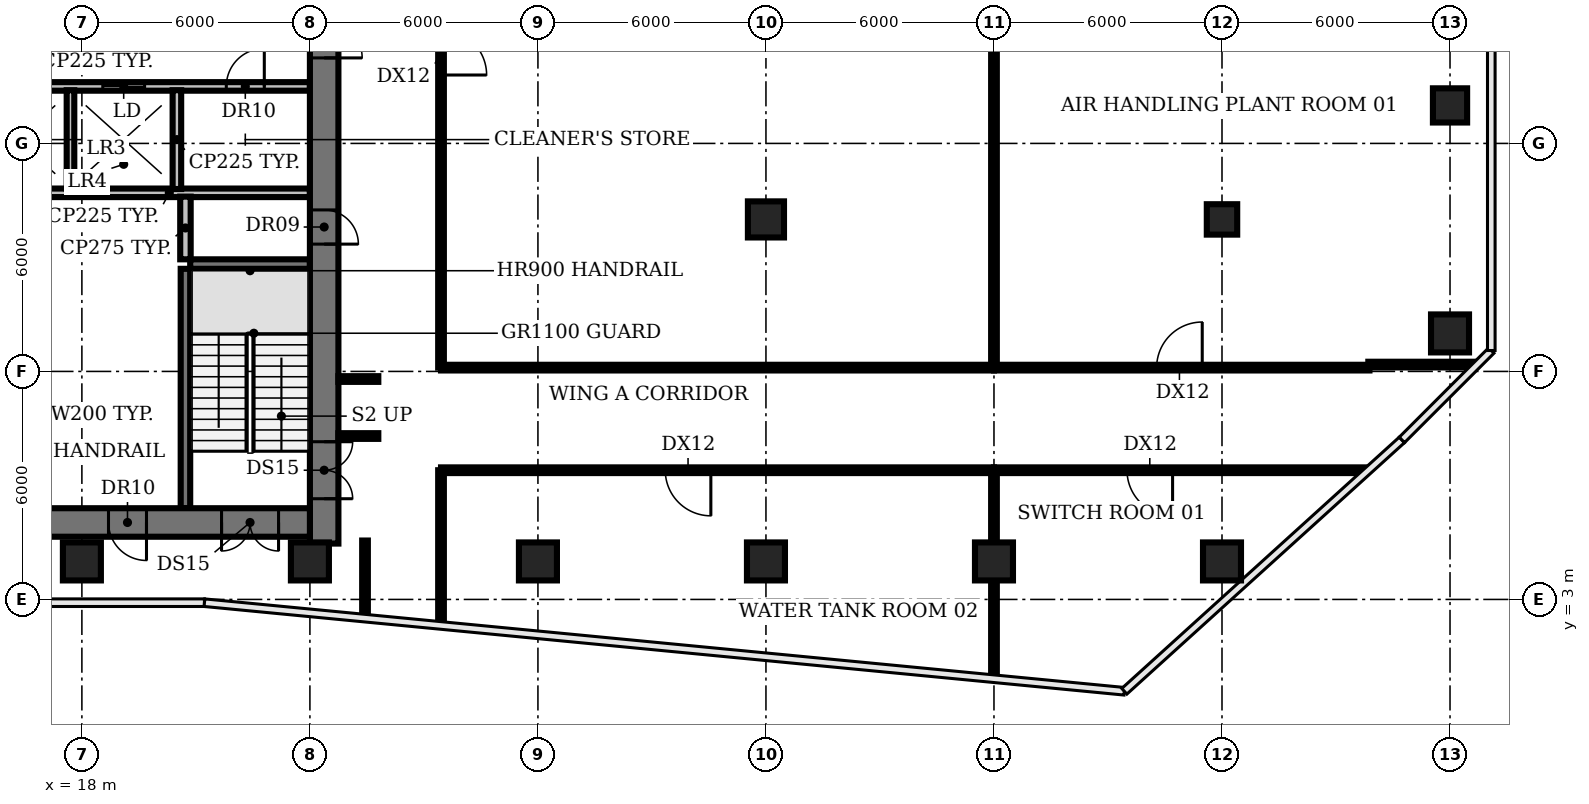
"""IFC4 building model, lengths in metres.
Left out: names, types, materials, properties, quantities, classifications, styles, units other than length and angle.
Written with IfcOpenShell. Run it as: python <this file> out.ifc"""

import sys

from ifc_helpers import new_model, si_unit, direction, frame, frame_2d, origin, origin_2d, place, context, subcontext, project, spatial, rectangle, circle, extrude, element, fill, save


model = new_model("IFC4")
c1 = context("Model", 3, precision=1e-05, world=origin(), true_north=direction((0.0, 1.0)))
c2 = subcontext(c1, "Body", "Model", "MODEL_VIEW")
j1 = project(units=[si_unit("LENGTHUNIT", "METRE"), si_unit("PLANEANGLEUNIT", "RADIAN")], contexts=[c1])
p1 = place(None, origin())
s1 = spatial("IfcSite", under=j1, at=p1, CompositionType="ELEMENT")
p2 = place(p1, origin())
s2 = spatial("IfcBuilding", under=s1, at=p2, CompositionType="ELEMENT")
p3 = place(p2, frame((0.0, 0.0, 134.0)))
s3 = spatial("IfcBuildingStorey", under=s2, at=p3, CompositionType="ELEMENT", Elevation=134.0)
for number, where, z_axis, x_axis in (
    (1, (18.0, 4.0, 0.0), (0.0, 0.0, 1.0), (1.0, 0.0, 0.0)),
    (2, (24.0, 4.0, 0.0), (0.0, 0.0, 1.0), (1.0, 0.0, 0.0)),
    (3, (30.0, 4.0, 0.0), (0.0, 0.0, 1.0), (1.0, 0.0, 0.0)),
    (4, (36.0, 4.0, 0.0), (0.0, 0.0, 1.0), (1.0, 0.0, 0.0)),
):
    element("IfcColumn", number, at=place(p3, frame(where, z_axis=z_axis, x_axis=x_axis)), inside=s3, PredefinedType="COLUMN", context=c2, shape_type="SweptSolid", body=[
        extrude(rectangle(XDim=1.0, YDim=1.0, at=origin_2d()), origin(), (0.0, 0.0, 1.0), 3.2),
    ])
p4 = place(p3, frame((36.0, 13.0, 0.0), z_axis=(0.0, 0.0, 1.0), x_axis=(1.0, 0.0, 0.0)))
e5 = element("IfcColumn", 5, at=p4, inside=s3, PredefinedType="COLUMN", context=c2, shape_type="SweptSolid", body=[
    extrude(rectangle(XDim=0.95, YDim=0.95, at=origin_2d()), origin(), (0.0, 0.0, 1.0), 3.2),
])
p5 = place(p3, frame((42.0, 4.0, 0.0), z_axis=(0.0, 0.0, 1.0), x_axis=(1.0, 0.0, 0.0)))
e6 = element("IfcColumn", 6, at=p5, inside=s3, PredefinedType="COLUMN", context=c2, shape_type="SweptSolid", body=[
    extrude(rectangle(XDim=1.0, YDim=1.0, at=origin_2d()), origin(), (0.0, 0.0, 1.0), 3.2),
])
p6 = place(p3, frame((48.0, 4.0, 0.0), z_axis=(0.0, 0.0, 1.0), x_axis=(1.0, 0.0, 0.0)))
e7 = element("IfcColumn", 7, at=p6, inside=s3, PredefinedType="COLUMN", context=c2, shape_type="SweptSolid", body=[
    extrude(circle(Radius=0.5, at=origin_2d()), origin(), (0.0, 0.0, 1.0), 3.8),
])
p7 = place(p3, frame((48.0, 13.0, 0.0), z_axis=(0.0, 0.0, 1.0), x_axis=(1.0, 0.0, 0.0)))
e8 = element("IfcColumn", 8, at=p7, inside=s3, PredefinedType="COLUMN", context=c2, shape_type="SweptSolid", body=[
    extrude(rectangle(XDim=0.8, YDim=0.8, at=origin_2d()), origin(), (0.0, 0.0, 1.0), 3.8),
])
p8 = place(p3, frame((54.0, 10.0, 0.0), z_axis=(0.0, 0.0, 1.0), x_axis=(1.0, 0.0, 0.0)))
e9 = element("IfcColumn", 9, at=p8, inside=s3, PredefinedType="COLUMN", context=c2, shape_type="SweptSolid", body=[
    extrude(circle(Radius=0.5, at=origin_2d()), origin(), (0.0, 0.0, 1.0), 3.8),
])
p9 = place(p3, frame((54.0, 16.0, 0.0), z_axis=(0.0, 0.0, 1.0), x_axis=(1.0, 0.0, 0.0)))
e10 = element("IfcColumn", 10, at=p9, inside=s3, PredefinedType="COLUMN", context=c2, shape_type="SweptSolid", body=[
    extrude(rectangle(XDim=0.9, YDim=0.9, at=origin_2d()), origin(), (0.0, 0.0, 1.0), 3.8),
])
p10 = place(p3, frame((20.85, 11.825, 0.0), z_axis=(0.0, 0.0, 1.0), x_axis=(1.0, 0.0, 0.0)))
e11 = element("IfcWall", 11, at=p10, inside=s3, PredefinedType="SHEAR", context=c2, shape_type="SweptSolid", body=[
    extrude(rectangle(XDim=3.15, YDim=0.25, at=frame_2d((1.575, 0.0))), origin(), (0.0, 0.0, 1.0), 3.8),
])
p11 = place(p3, frame((16.6, 13.7, 0.0), z_axis=(0.0, 0.0, 1.0), x_axis=(1.0, 0.0, 0.0)))
e12 = element("IfcWall", 12, at=p11, inside=s3, PredefinedType="PARTITIONING", context=c2, shape_type="SweptSolid", body=[
    extrude(rectangle(XDim=7.4, YDim=0.225, at=frame_2d((3.7, 0.0))), origin(), (0.0, 0.0, 1.0), 3.8),
])
p12 = place(p3, frame((9.4, 16.5, 0.0), z_axis=(0.0, 0.0, 1.0), x_axis=(1.0, 0.0, 0.0)))
e13 = element("IfcWall", 13, at=p12, inside=s3, PredefinedType="PARTITIONING", context=c2, shape_type="SweptSolid", body=[
    extrude(rectangle(XDim=14.6, YDim=0.225, at=frame_2d((7.3, 0.0))), origin(), (0.0, 0.0, 1.0), 3.8),
])
p13 = place(p12, frame((0.75, 0.0, 0.0)))
e14 = element("IfcOpeningElement", 14, at=p13, cuts=e13, PredefinedType="OPENING", context=c2, shape_type="SweptSolid", body=[
    extrude(rectangle(XDim=1.1, YDim=2.1, at=frame_2d((0.55, 1.05))), frame((0.0, 0.123, 0.0), z_axis=(0.0, -1.0, 0.0), x_axis=(1.0, 0.0, 0.0)), (0.0, 0.0, 1.0), 0.245),
])
p14 = place(p12, frame((3.55, 0.0, 0.0)))
e15 = element("IfcOpeningElement", 15, at=p14, cuts=e13, PredefinedType="OPENING", context=c2, shape_type="SweptSolid", body=[
    extrude(rectangle(XDim=1.1, YDim=2.1, at=frame_2d((0.55, 1.05))), frame((0.0, 0.123, 0.0), z_axis=(0.0, -1.0, 0.0), x_axis=(1.0, 0.0, 0.0)), (0.0, 0.0, 1.0), 0.245),
])
p15 = place(p12, frame((6.35, 0.0, 0.0)))
e16 = element("IfcOpeningElement", 16, at=p15, cuts=e13, PredefinedType="OPENING", context=c2, shape_type="SweptSolid", body=[
    extrude(rectangle(XDim=1.1, YDim=2.1, at=frame_2d((0.55, 1.05))), frame((0.0, 0.123, 0.0), z_axis=(0.0, -1.0, 0.0), x_axis=(1.0, 0.0, 0.0)), (0.0, 0.0, 1.0), 0.245),
])
p16 = place(p12, frame((9.15, 0.0, 0.0)))
e17 = element("IfcOpeningElement", 17, at=p16, cuts=e13, PredefinedType="OPENING", context=c2, shape_type="SweptSolid", body=[
    extrude(rectangle(XDim=1.1, YDim=2.1, at=frame_2d((0.55, 1.05))), frame((0.0, 0.123, 0.0), z_axis=(0.0, -1.0, 0.0), x_axis=(1.0, 0.0, 0.0)), (0.0, 0.0, 1.0), 0.245),
])
p17 = place(p12, frame((12.4, 0.0, 0.0)))
e18 = element("IfcOpeningElement", 18, at=p17, cuts=e13, PredefinedType="OPENING", context=c2, shape_type="SweptSolid", body=[
    extrude(rectangle(XDim=1.0, YDim=2.1, at=frame_2d((0.5, 1.05))), frame((0.0, 0.123, 0.0), z_axis=(0.0, -1.0, 0.0), x_axis=(1.0, 0.0, 0.0)), (0.0, 0.0, 1.0), 0.245),
])
p18 = place(p3, frame((17.7, 13.8, 0.0), z_axis=(0.0, 0.0, 1.0), x_axis=(0.0, 1.0, 0.0)))
e19 = element("IfcWall", 19, at=p18, inside=s3, PredefinedType="SOLIDWALL", context=c2, shape_type="SweptSolid", body=[
    extrude(rectangle(XDim=2.6, YDim=0.2, at=frame_2d((1.3, 0.0))), origin(), (0.0, 0.0, 1.0), 3.8),
])
p19 = place(p3, frame((20.5, 13.8, 0.0), z_axis=(0.0, 0.0, 1.0), x_axis=(0.0, 1.0, 0.0)))
e20 = element("IfcWall", 20, at=p19, inside=s3, PredefinedType="PARTITIONING", context=c2, shape_type="SweptSolid", body=[
    extrude(rectangle(XDim=2.6, YDim=0.225, at=frame_2d((1.3, 0.0))), origin(), (0.0, 0.0, 1.0), 3.8),
])
p20 = place(p3, frame((20.725, 5.4, 0.0), z_axis=(0.0, 0.0, 1.0), x_axis=(0.0, 1.0, 0.0)))
e21 = element("IfcWall", 21, at=p20, inside=s3, PredefinedType="SHEAR", context=c2, shape_type="SweptSolid", body=[
    extrude(rectangle(XDim=6.3, YDim=0.25, at=frame_2d((3.15, 0.0))), origin(), (0.0, 0.0, 1.0), 3.8),
])
p21 = place(p3, frame((20.725, 11.95, 0.0), z_axis=(0.0, 0.0, 1.0), x_axis=(0.0, 1.0, 0.0)))
e22 = element("IfcWall", 22, at=p21, inside=s3, PredefinedType="PARTITIONING", context=c2, shape_type="SweptSolid", body=[
    extrude(rectangle(XDim=1.65, YDim=0.275, at=frame_2d((0.825, 0.0))), origin(), (0.0, 0.0, 1.0), 3.8),
])
p22 = place(p3, frame((24.375, 25.55, 0.0), z_axis=(0.0, 0.0, 1.0), x_axis=(0.0, -1.0, 0.0)))
e23 = element("IfcWall", 23, at=p22, inside=s3, PredefinedType="SHEAR", context=c2, shape_type="SweptSolid", body=[
    extrude(rectangle(XDim=21.08, YDim=0.75, at=frame_2d((10.54, 0.0))), origin(), (0.0, 0.0, 1.0), 3.8),
])
p23 = place(p22, frame((18.4, 0.0, 0.0)))
e24 = element("IfcOpeningElement", 24, at=p23, cuts=e23, PredefinedType="OPENING", context=c2, shape_type="SweptSolid", body=[
    extrude(rectangle(XDim=1.5, YDim=2.1, at=frame_2d((0.75, 1.05))), frame((0.0, 0.385, 0.0), z_axis=(0.0, -1.0, 0.0), x_axis=(1.0, 0.0, 0.0)), (0.0, 0.0, 1.0), 0.77),
])
p24 = place(p22, frame((12.3, 0.0, 0.0)))
e25 = element("IfcOpeningElement", 25, at=p24, cuts=e23, PredefinedType="OPENING", context=c2, shape_type="SweptSolid", body=[
    extrude(rectangle(XDim=0.9, YDim=2.1, at=frame_2d((0.45, 1.05))), frame((0.0, 0.385, 0.0), z_axis=(0.0, -1.0, 0.0), x_axis=(1.0, 0.0, 0.0)), (0.0, 0.0, 1.0), 0.77),
])
p25 = place(p22, frame((6.3, 0.0, 0.0)))
e26 = element("IfcOpeningElement", 26, at=p25, cuts=e23, PredefinedType="OPENING", context=c2, shape_type="SweptSolid", body=[
    extrude(rectangle(XDim=2.0, YDim=2.1, at=frame_2d((1.0, 1.05))), frame((0.0, 0.385, 0.0), z_axis=(0.0, -1.0, 0.0), x_axis=(1.0, 0.0, 0.0)), (0.0, 0.0, 1.0), 0.77),
])
p26 = place(p3, frame((24.0, 5.025, 0.0), z_axis=(0.0, 0.0, 1.0), x_axis=(-1.0, 0.0, 0.0)))
e27 = element("IfcWall", 27, at=p26, inside=s3, PredefinedType="SHEAR", context=c2, shape_type="SweptSolid", body=[
    extrude(rectangle(XDim=18.0, YDim=0.75, at=frame_2d((9.0, 0.0))), origin(), (0.0, 0.0, 1.0), 3.8),
])
p27 = place(p26, frame((0.825, 0.0, 0.0)))
e28 = element("IfcOpeningElement", 28, at=p27, cuts=e27, PredefinedType="OPENING", context=c2, shape_type="SweptSolid", body=[
    extrude(rectangle(XDim=1.5, YDim=2.1, at=frame_2d((0.75, 1.05))), frame((0.0, 0.385, 0.0), z_axis=(0.0, -1.0, 0.0), x_axis=(1.0, 0.0, 0.0)), (0.0, 0.0, 1.0), 0.77),
])
p28 = place(p26, frame((15.675, 0.0, 0.0)))
e29 = element("IfcOpeningElement", 29, at=p28, cuts=e27, PredefinedType="OPENING", context=c2, shape_type="SweptSolid", body=[
    extrude(rectangle(XDim=1.5, YDim=2.1, at=frame_2d((0.75, 1.05))), frame((0.0, 0.385, 0.0), z_axis=(0.0, -1.0, 0.0), x_axis=(1.0, 0.0, 0.0)), (0.0, 0.0, 1.0), 0.77),
])
p29 = place(p26, frame((13.0, 0.0, 0.0)))
e30 = element("IfcOpeningElement", 30, at=p29, cuts=e27, PredefinedType="OPENING", context=c2, shape_type="SweptSolid", body=[
    extrude(rectangle(XDim=1.2, YDim=2.1, at=frame_2d((0.6, 1.05))), frame((0.0, 0.385, 0.0), z_axis=(0.0, -1.0, 0.0), x_axis=(1.0, 0.0, 0.0)), (0.0, 0.0, 1.0), 0.77),
])
p30 = place(p26, frame((4.3, 0.0, 0.0)))
e31 = element("IfcOpeningElement", 31, at=p30, cuts=e27, PredefinedType="OPENING", context=c2, shape_type="SweptSolid", body=[
    extrude(rectangle(XDim=1.0, YDim=2.1, at=frame_2d((0.5, 1.05))), frame((0.0, 0.385, 0.0), z_axis=(0.0, -1.0, 0.0), x_axis=(1.0, 0.0, 0.0)), (0.0, 0.0, 1.0), 0.77),
])
for number, where, z_axis, x_axis in (
    (32, (24.75, 7.3, 0.0), (0.0, 0.0, 1.0), (1.0, 0.0, 0.0)),
    (33, (24.75, 8.8, 0.0), (0.0, 0.0, 1.0), (1.0, 0.0, 0.0)),
):
    element("IfcWall", number, at=place(p3, frame(where, z_axis=z_axis, x_axis=x_axis)), inside=s3, PredefinedType="PARTITIONING", context=c2, shape_type="SweptSolid", body=[
        extrude(rectangle(XDim=1.05, YDim=0.15, at=frame_2d((0.525, 0.0))), origin(), (0.0, 0.0, 1.0), 2.78),
    ])
p31 = place(p3, frame((25.45, 2.56, 0.0), z_axis=(0.0, 0.0, 1.0), x_axis=(0.0, 1.0, 0.0)))
e34 = element("IfcWall", 34, at=p31, inside=s3, PredefinedType="PARTITIONING", context=c2, shape_type="SweptSolid", body=[
    extrude(rectangle(XDim=1.99, YDim=0.15, at=frame_2d((0.995, 0.0))), origin(), (0.0, 0.0, 1.0), 2.78),
])
p32 = place(p3, frame((27.45, 2.36, 0.0), z_axis=(0.0, 0.0, 1.0), x_axis=(0.0, 1.0, 0.0)))
e35 = element("IfcWall", 35, at=p32, inside=s3, PredefinedType="PARTITIONING", context=c2, shape_type="SweptSolid", body=[
    extrude(rectangle(XDim=4.04, YDim=0.15, at=frame_2d((2.02, 0.0))), origin(), (0.0, 0.0, 1.0), 2.78),
])
p33 = place(p3, frame((27.45, 9.1, 0.0), z_axis=(0.0, 0.0, 1.0), x_axis=(1.0, 0.0, 0.0)))
e36 = element("IfcWall", 36, at=p33, inside=s3, PredefinedType="PARTITIONING", context=c2, shape_type="SweptSolid", body=[
    extrude(rectangle(XDim=14.55, YDim=0.15, at=frame_2d((7.275, 0.0))), origin(), (0.0, 0.0, 1.0), 2.78),
])
p34 = place(p3, frame((27.45, 25.55, 0.0), z_axis=(0.0, 0.0, 1.0), x_axis=(0.0, -1.0, 0.0)))
e37 = element("IfcWall", 37, at=p34, inside=s3, PredefinedType="PARTITIONING", context=c2, shape_type="SweptSolid", body=[
    extrude(rectangle(XDim=16.45, YDim=0.15, at=frame_2d((8.225, 0.0))), origin(), (0.0, 0.0, 1.0), 2.78),
])
p35 = place(p34, frame((7.55, 0.0, 0.0)))
e38 = element("IfcOpeningElement", 38, at=p35, cuts=e37, PredefinedType="OPENING", context=c2, shape_type="SweptSolid", body=[
    extrude(rectangle(XDim=1.2, YDim=2.1, at=frame_2d((0.6, 1.05))), frame((0.0, 0.085, 0.0), z_axis=(0.0, -1.0, 0.0), x_axis=(1.0, 0.0, 0.0)), (0.0, 0.0, 1.0), 0.17),
])
p36 = place(p3, frame((42.0, 0.96, 0.0), z_axis=(0.0, 0.0, 1.0), x_axis=(0.0, 1.0, 0.0)))
e39 = element("IfcWall", 39, at=p36, inside=s3, PredefinedType="PARTITIONING", context=c2, shape_type="SweptSolid", body=[
    extrude(rectangle(XDim=5.44, YDim=0.15, at=frame_2d((2.72, 0.0))), origin(), (0.0, 0.0, 1.0), 2.78),
])
p37 = place(p3, frame((42.0, 6.4, 0.0), z_axis=(0.0, 0.0, 1.0), x_axis=(-1.0, 0.0, 0.0)))
e40 = element("IfcWall", 40, at=p37, inside=s3, PredefinedType="PARTITIONING", context=c2, shape_type="SweptSolid", body=[
    extrude(rectangle(XDim=14.55, YDim=0.15, at=frame_2d((7.275, 0.0))), origin(), (0.0, 0.0, 1.0), 2.78),
])
p38 = place(p37, frame((7.45, 0.0, 0.0)))
e41 = element("IfcOpeningElement", 41, at=p38, cuts=e40, PredefinedType="OPENING", context=c2, shape_type="SweptSolid", body=[
    extrude(rectangle(XDim=1.2, YDim=2.1, at=frame_2d((0.6, 1.05))), frame((0.0, 0.085, 0.0), z_axis=(0.0, -1.0, 0.0), x_axis=(1.0, 0.0, 0.0)), (0.0, 0.0, 1.0), 0.17),
])
p39 = place(p3, frame((42.0, 9.1, 0.0), z_axis=(0.0, 0.0, 1.0), x_axis=(0.0, 1.0, 0.0)))
e42 = element("IfcWall", 42, at=p39, inside=s3, PredefinedType="PARTITIONING", context=c2, shape_type="SweptSolid", body=[
    extrude(rectangle(XDim=19.94, YDim=0.15, at=frame_2d((9.97, 0.0))), origin(), (0.0, 0.0, 1.0), 2.78),
])
p40 = place(p3, frame((42.0, 9.1, 0.0), z_axis=(0.0, 0.0, 1.0), x_axis=(1.0, 0.0, 0.0)))
e43 = element("IfcWall", 43, at=p40, inside=s3, PredefinedType="PARTITIONING", context=c2, shape_type="SweptSolid", body=[
    extrude(rectangle(XDim=9.88, YDim=0.15, at=frame_2d((4.94, 0.0))), origin(), (0.0, 0.0, 1.0), 2.78),
])
p41 = place(p40, frame((4.28, 0.0, 0.0)))
e44 = element("IfcOpeningElement", 44, at=p41, cuts=e43, PredefinedType="OPENING", context=c2, shape_type="SweptSolid", body=[
    extrude(rectangle(XDim=1.2, YDim=2.1, at=frame_2d((0.6, 1.05))), frame((0.0, 0.085, 0.0), z_axis=(0.0, -1.0, 0.0), x_axis=(1.0, 0.0, 0.0)), (0.0, 0.0, 1.0), 0.17),
])
p42 = place(p3, frame((51.78, 6.4, 0.0), z_axis=(0.0, 0.0, 1.0), x_axis=(-1.0, 0.0, 0.0)))
e45 = element("IfcWall", 45, at=p42, inside=s3, PredefinedType="PARTITIONING", context=c2, shape_type="SweptSolid", body=[
    extrude(rectangle(XDim=9.78, YDim=0.15, at=frame_2d((4.89, 0.0))), origin(), (0.0, 0.0, 1.0), 2.78),
])
p43 = place(p42, frame((5.08, 0.0, 0.0)))
e46 = element("IfcOpeningElement", 46, at=p43, cuts=e45, PredefinedType="OPENING", context=c2, shape_type="SweptSolid", body=[
    extrude(rectangle(XDim=1.2, YDim=2.1, at=frame_2d((0.6, 1.05))), frame((0.0, 0.085, 0.0), z_axis=(0.0, -1.0, 0.0), x_axis=(1.0, 0.0, 0.0)), (0.0, 0.0, 1.0), 0.17),
])
p44 = place(p3, frame((51.85, 9.18, 0.0), z_axis=(0.0, 0.0, 1.0), x_axis=(1.0, 0.0, 0.0)))
e47 = element("IfcWall", 47, at=p44, inside=s3, PredefinedType="PARTITIONING", context=c2, shape_type="SweptSolid", body=[
    extrude(rectangle(XDim=2.781, YDim=0.15, at=frame_2d((1.391, 0.0))), origin(), (0.0, 0.0, 1.0), 2.78),
])
p45 = place(p16, origin())
e48 = element("IfcDoor", 48, at=p45, inside=s3, OperationType="DOUBLE_DOOR_SLIDING", PredefinedType="DOOR", context=c2, shape_type="SweptSolid", body=[
    extrude(rectangle(XDim=1.1, YDim=2.1, at=frame_2d((0.55, 1.05))), frame((0.0, 0.025, 0.0), z_axis=(0.0, -1.0, 0.0), x_axis=(1.0, 0.0, 0.0)), (0.0, 0.0, 1.0), 0.05),
])
fill(e17, e48)
p46 = place(p17, origin())
e49 = element("IfcDoor", 49, at=p46, inside=s3, OperationType="SINGLE_SWING_RIGHT", PredefinedType="DOOR", context=c2, shape_type="SweptSolid", body=[
    extrude(rectangle(XDim=1.0, YDim=2.1, at=frame_2d((0.5, 1.05))), frame((0.0, 0.025, 0.0), z_axis=(0.0, -1.0, 0.0), x_axis=(1.0, 0.0, 0.0)), (0.0, 0.0, 1.0), 0.05),
])
fill(e18, e49)
p47 = place(p23, origin())
e50 = element("IfcDoor", 50, at=p47, inside=s3, OperationType="DOUBLE_DOOR_SINGLE_SWING", PredefinedType="DOOR", context=c2, shape_type="SweptSolid", body=[
    extrude(rectangle(XDim=1.5, YDim=2.1, at=frame_2d((0.75, 1.05))), frame((0.0, 0.025, 0.0), z_axis=(0.0, -1.0, 0.0), x_axis=(1.0, 0.0, 0.0)), (0.0, 0.0, 1.0), 0.05),
])
fill(e24, e50)
p48 = place(p24, origin())
e51 = element("IfcDoor", 51, at=p48, inside=s3, OperationType="SINGLE_SWING_RIGHT", PredefinedType="DOOR", context=c2, shape_type="SweptSolid", body=[
    extrude(rectangle(XDim=0.9, YDim=2.1, at=frame_2d((0.45, 1.05))), frame((0.0, -0.315, 0.0), z_axis=(0.0, -1.0, 0.0), x_axis=(1.0, 0.0, 0.0)), (0.0, 0.0, 1.0), 0.05),
])
fill(e25, e51)
p49 = place(p25, origin())
e52 = element("IfcDoor", 52, at=p49, inside=s3, OperationType="DOUBLE_DOOR_SINGLE_SWING", PredefinedType="DOOR", context=c2, shape_type="SweptSolid", body=[
    extrude(rectangle(XDim=2.0, YDim=2.1, at=frame_2d((1.0, 1.05))), frame((0.0, 0.025, 0.0), z_axis=(0.0, -1.0, 0.0), x_axis=(1.0, 0.0, 0.0)), (0.0, 0.0, 1.0), 0.05),
])
fill(e26, e52)
p50 = place(p27, origin())
e53 = element("IfcDoor", 53, at=p50, inside=s3, OperationType="DOUBLE_DOOR_SINGLE_SWING", PredefinedType="DOOR", context=c2, shape_type="SweptSolid", body=[
    extrude(rectangle(XDim=1.5, YDim=2.1, at=frame_2d((0.75, 1.05))), frame((0.0, 0.025, 0.0), z_axis=(0.0, -1.0, 0.0), x_axis=(1.0, 0.0, 0.0)), (0.0, 0.0, 1.0), 0.05),
])
fill(e28, e53)
p51 = place(p30, origin())
e54 = element("IfcDoor", 54, at=p51, inside=s3, OperationType="SINGLE_SWING_LEFT", PredefinedType="DOOR", context=c2, shape_type="SweptSolid", body=[
    extrude(rectangle(XDim=1.0, YDim=2.1, at=frame_2d((0.5, 1.05))), frame((0.0, -0.315, 0.0), z_axis=(0.0, -1.0, 0.0), x_axis=(1.0, 0.0, 0.0)), (0.0, 0.0, 1.0), 0.05),
])
fill(e31, e54)
p52 = place(p35, origin())
e55 = element("IfcDoor", 55, at=p52, inside=s3, OperationType="SINGLE_SWING_RIGHT", PredefinedType="DOOR", context=c2, shape_type="SweptSolid", body=[
    extrude(rectangle(XDim=1.2, YDim=2.1, at=frame_2d((0.6, 1.05))), frame((0.0, 0.025, 0.0), z_axis=(0.0, -1.0, 0.0), x_axis=(1.0, 0.0, 0.0)), (0.0, 0.0, 1.0), 0.05),
])
fill(e38, e55)
p53 = place(p38, origin())
e56 = element("IfcDoor", 56, at=p53, inside=s3, OperationType="SINGLE_SWING_LEFT", PredefinedType="DOOR", context=c2, shape_type="SweptSolid", body=[
    extrude(rectangle(XDim=1.2, YDim=2.1, at=frame_2d((0.6, 1.05))), frame((0.0, 0.025, 0.0), z_axis=(0.0, -1.0, 0.0), x_axis=(1.0, 0.0, 0.0)), (0.0, 0.0, 1.0), 0.05),
])
fill(e41, e56)
p54 = place(p41, origin())
e57 = element("IfcDoor", 57, at=p54, inside=s3, OperationType="SINGLE_SWING_RIGHT", PredefinedType="DOOR", context=c2, shape_type="SweptSolid", body=[
    extrude(rectangle(XDim=1.2, YDim=2.1, at=frame_2d((0.6, 1.05))), frame((0.0, 0.025, 0.0), z_axis=(0.0, -1.0, 0.0), x_axis=(1.0, 0.0, 0.0)), (0.0, 0.0, 1.0), 0.05),
])
fill(e44, e57)
p55 = place(p43, origin())
e58 = element("IfcDoor", 58, at=p55, inside=s3, OperationType="SINGLE_SWING_LEFT", PredefinedType="DOOR", context=c2, shape_type="SweptSolid", body=[
    extrude(rectangle(XDim=1.2, YDim=2.1, at=frame_2d((0.6, 1.05))), frame((0.0, 0.025, 0.0), z_axis=(0.0, -1.0, 0.0), x_axis=(1.0, 0.0, 0.0)), (0.0, 0.0, 1.0), 0.05),
])
fill(e46, e58)
save(model, sys.argv[1])
